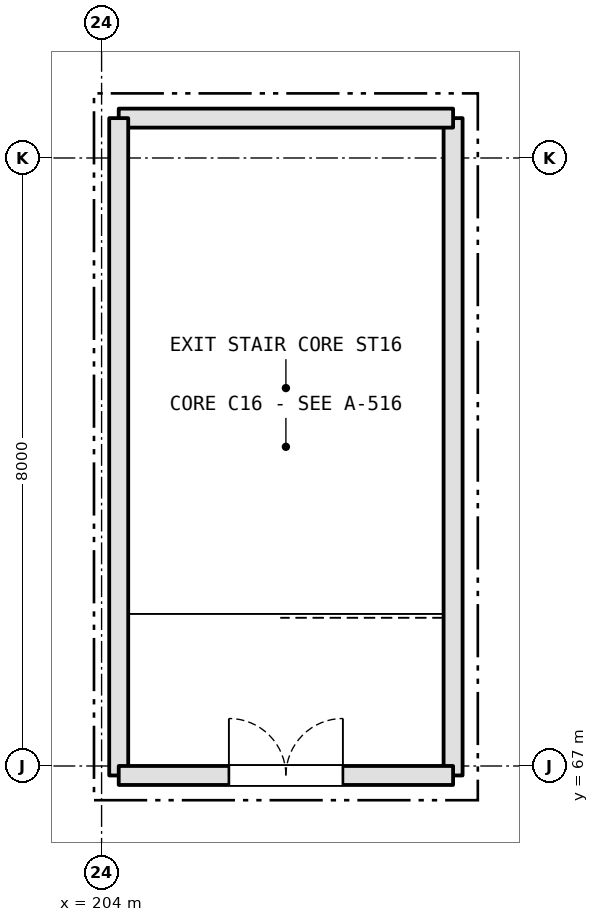
"""IFC4 building model, lengths in metres.
Left out: names, types, materials, properties, quantities, classifications, styles, units other than length and angle.
Written with IfcOpenShell. Run it as: python <this file> out.ifc"""

import sys

from ifc_helpers import new_model, si_unit, direction, frame, frame_2d, origin, place, context, subcontext, project, spatial, rectangle, extrude, element, fill, save


model = new_model("IFC4")
c1 = context("Model", 3, precision=1e-05, world=origin(), true_north=direction((0.0, 1.0)))
c2 = subcontext(c1, "Body", "Model", "MODEL_VIEW")
j1 = project(units=[si_unit("LENGTHUNIT", "METRE"), si_unit("PLANEANGLEUNIT", "RADIAN")], contexts=[c1])
p1 = place(None, origin())
s1 = spatial("IfcSite", under=j1, at=p1, CompositionType="ELEMENT")
p2 = place(p1, origin())
s2 = spatial("IfcBuilding", under=s1, at=p2, CompositionType="ELEMENT")
p3 = place(p2, frame((0.0, 0.0, 16.2)))
s3 = spatial("IfcBuildingStorey", under=s2, at=p3, CompositionType="ELEMENT", Elevation=16.2)
p4 = place(p3, frame((208.625, 66.875, 0.0), z_axis=(0.0, 0.0, 1.0), x_axis=(0.0, 1.0, 0.0)))
e1 = element("IfcWall", 1, at=p4, inside=s3, PredefinedType="SHEAR", context=c2, shape_type="SweptSolid", body=[
    extrude(rectangle(XDim=8.649, YDim=0.25, at=frame_2d((4.325, 0.0))), origin(), (0.0, 0.0, 1.0), 5.14),
])
p5 = place(p3, frame((208.625, 75.525, 0.0), z_axis=(0.0, 0.0, 1.0), x_axis=(-1.0, 0.0, 0.0)))
e2 = element("IfcWall", 2, at=p5, inside=s3, PredefinedType="SHEAR", context=c2, shape_type="SweptSolid", body=[
    extrude(rectangle(XDim=4.399, YDim=0.25, at=frame_2d((2.2, 0.0))), origin(), (0.0, 0.0, 1.0), 5.14),
])
p6 = place(p3, frame((204.225, 75.525, 0.0), z_axis=(0.0, 0.0, 1.0), x_axis=(0.0, -1.0, 0.0)))
e3 = element("IfcWall", 3, at=p6, inside=s3, PredefinedType="SHEAR", context=c2, shape_type="SweptSolid", body=[
    extrude(rectangle(XDim=8.649, YDim=0.25, at=frame_2d((4.325, 0.0))), origin(), (0.0, 0.0, 1.0), 5.14),
])
p7 = place(p3, frame((204.225, 66.875, 0.0), z_axis=(0.0, 0.0, 1.0), x_axis=(1.0, 0.0, 0.0)))
e4 = element("IfcWall", 4, at=p7, inside=s3, PredefinedType="SHEAR", context=c2, shape_type="SweptSolid", body=[
    extrude(rectangle(XDim=4.399, YDim=0.25, at=frame_2d((2.2, 0.0))), origin(), (0.0, 0.0, 1.0), 5.14),
])
p8 = place(p7, frame((1.45, 0.0, 0.0)))
e5 = element("IfcOpeningElement", 5, at=p8, cuts=e4, PredefinedType="OPENING", context=c2, shape_type="SweptSolid", body=[
    extrude(rectangle(XDim=1.5, YDim=2.2, at=frame_2d((0.75, 1.1))), frame((0.0, 0.135, 0.0), z_axis=(0.0, -1.0, 0.0), x_axis=(1.0, 0.0, 0.0)), (0.0, 0.0, 1.0), 0.27),
])
p9 = place(p8, origin())
e6 = element("IfcDoor", 6, at=p9, inside=s3, OperationType="DOUBLE_DOOR_SINGLE_SWING", PredefinedType="DOOR", context=c2, shape_type="SweptSolid", body=[
    extrude(rectangle(XDim=1.5, YDim=2.2, at=frame_2d((0.75, 1.1))), frame((0.0, 0.025, 0.0), z_axis=(0.0, -1.0, 0.0), x_axis=(1.0, 0.0, 0.0)), (0.0, 0.0, 1.0), 0.05),
])
fill(e5, e6)
save(model, sys.argv[1])
